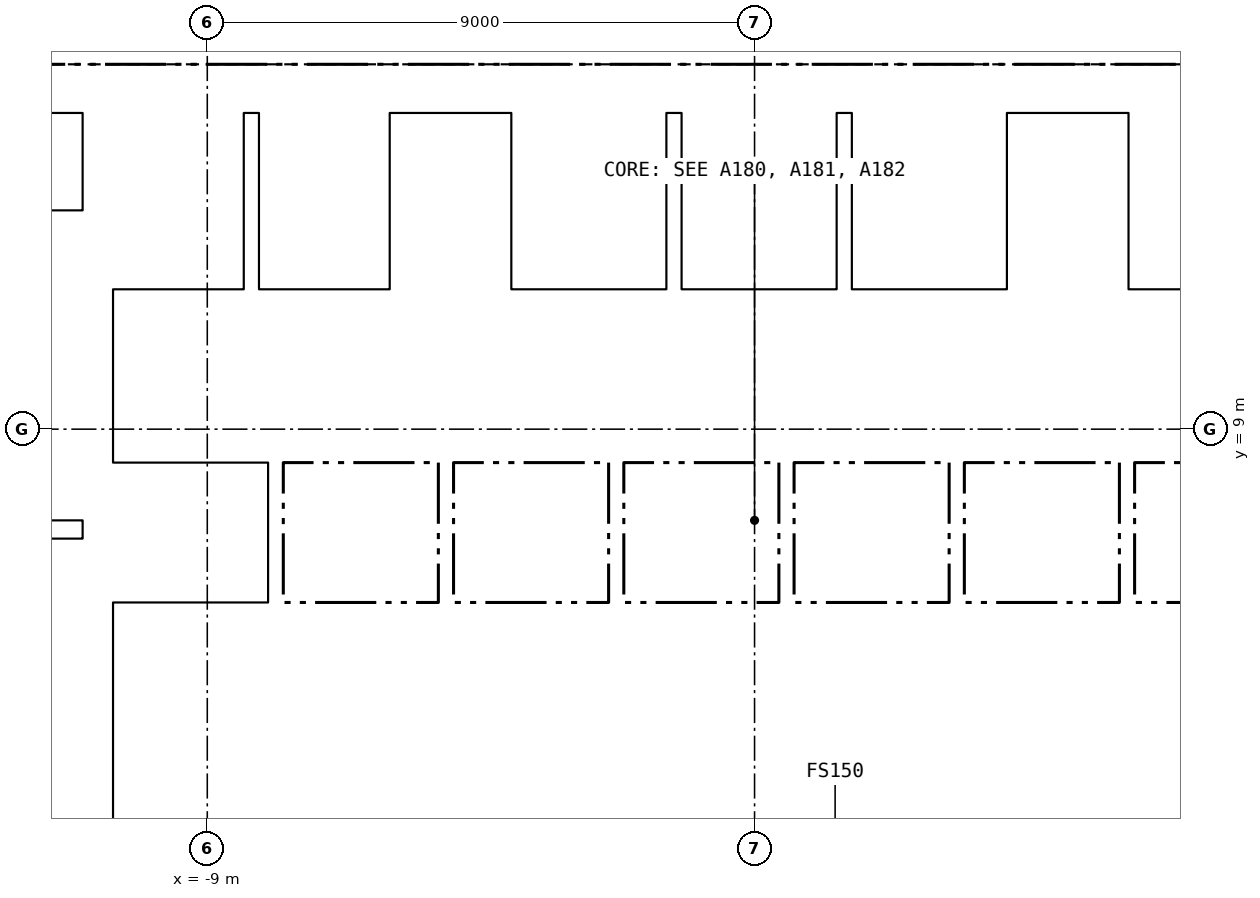
"""IFC4 building model, lengths in metres.
Left out: names, types, materials, properties, quantities, classifications, styles, units other than length and angle.
Written with IfcOpenShell. Run it as: python <this file> out.ifc"""

import sys

from ifc_helpers import new_model, si_unit, direction, frame, frame_2d, origin, place, context, subcontext, project, spatial, rectangle, extrude, element, fill, save


model = new_model("IFC4")
c1 = context("Model", 3, precision=1e-05, world=origin(), true_north=direction((0.0, 1.0)))
c2 = subcontext(c1, "Body", "Model", "MODEL_VIEW")
j1 = project(units=[si_unit("LENGTHUNIT", "METRE"), si_unit("PLANEANGLEUNIT", "RADIAN")], contexts=[c1])
p1 = place(None, origin())
s1 = spatial("IfcSite", under=j1, at=p1, CompositionType="ELEMENT")
p2 = place(p1, origin())
s2 = spatial("IfcBuilding", under=s1, at=p2, CompositionType="ELEMENT")
p3 = place(p2, frame((0.0, 0.0, 148.05)))
s3 = spatial("IfcBuildingStorey", under=s2, at=p3, CompositionType="ELEMENT", Elevation=148.05)
p4 = place(p3, frame((-15.0, 14.6, -0.15), z_axis=(0.0, 0.0, 1.0), x_axis=(1.0, 0.0, 0.0)))
e1 = element("IfcWall", 1, at=p4, inside=s3, PredefinedType="SOLIDWALL", context=c2, shape_type="SweptSolid", body=[
    extrude(rectangle(XDim=30.0, YDim=0.8, at=frame_2d((15.0, 0.0))), origin(), (0.0, 0.0, 1.0), 3.65),
])
p5 = place(p4, frame((9.25, 0.0, 0.15)))
e2 = element("IfcOpeningElement", 2, at=p5, cuts=e1, PredefinedType="OPENING", context=c2, shape_type="SweptSolid", body=[
    extrude(rectangle(XDim=1.5, YDim=2.1, at=frame_2d((0.75, 1.05))), frame((0.0, 0.41, 0.0), z_axis=(0.0, -1.0, 0.0), x_axis=(1.0, 0.0, 0.0)), (0.0, 0.0, 1.0), 0.82),
])
p6 = place(p4, frame((19.4, 0.0, 0.15)))
e3 = element("IfcOpeningElement", 3, at=p6, cuts=e1, PredefinedType="OPENING", context=c2, shape_type="SweptSolid", body=[
    extrude(rectangle(XDim=1.5, YDim=2.1, at=frame_2d((0.75, 1.05))), frame((0.0, 0.41, 0.0), z_axis=(0.0, -1.0, 0.0), x_axis=(1.0, 0.0, 0.0)), (0.0, 0.0, 1.0), 0.82),
])
p7 = place(p4, frame((1.5, 0.0, 0.15)))
e4 = element("IfcOpeningElement", 4, at=p7, cuts=e1, PredefinedType="OPENING", context=c2, shape_type="SweptSolid", body=[
    extrude(rectangle(XDim=1.2, YDim=2.1, at=frame_2d((0.6, 1.05))), frame((0.0, 0.41, 0.0), z_axis=(0.0, -1.0, 0.0), x_axis=(1.0, 0.0, 0.0)), (0.0, 0.0, 1.0), 0.82),
])
p8 = place(p4, frame((27.3, 0.0, 0.15)))
e5 = element("IfcOpeningElement", 5, at=p8, cuts=e1, PredefinedType="OPENING", context=c2, shape_type="SweptSolid", body=[
    extrude(rectangle(XDim=1.2, YDim=2.1, at=frame_2d((0.6, 1.05))), frame((0.0, 0.41, 0.0), z_axis=(0.0, -1.0, 0.0), x_axis=(1.0, 0.0, 0.0)), (0.0, 0.0, 1.0), 0.82),
])
p9 = place(p3, frame((-10.8, 0.8, -0.15), z_axis=(0.0, 0.0, 1.0), x_axis=(0.0, 1.0, 0.0)))
e6 = element("IfcWall", 6, at=p9, inside=s3, PredefinedType="SOLIDWALL", context=c2, shape_type="SweptSolid", body=[
    extrude(rectangle(XDim=13.4, YDim=0.5, at=frame_2d((6.7, 0.0))), origin(), (0.0, 0.0, 1.0), 3.65),
])
p10 = place(p3, frame((-10.55, 3.5, 0.0), z_axis=(0.0, 0.0, 1.0), x_axis=(1.0, 0.0, 0.0)))
e7 = element("IfcWall", 7, at=p10, inside=s3, PredefinedType="PARTITIONING", context=c2, shape_type="SweptSolid", body=[
    extrude(rectangle(XDim=21.1, YDim=0.2, at=frame_2d((10.55, 0.0))), origin(), (0.0, 0.0, 1.0), 3.5),
])
p11 = place(p10, frame((2.312, 0.0, 0.0)))
e8 = element("IfcOpeningElement", 8, at=p11, cuts=e7, PredefinedType="OPENING", context=c2, shape_type="SweptSolid", body=[
    extrude(rectangle(XDim=1.0, YDim=2.1, at=frame_2d((0.5, 1.05))), frame((0.0, 0.11, 0.0), z_axis=(0.0, -1.0, 0.0), x_axis=(1.0, 0.0, 0.0)), (0.0, 0.0, 1.0), 0.22),
])
p12 = place(p10, frame((7.05, 0.0, 0.0)))
e9 = element("IfcOpeningElement", 9, at=p12, cuts=e7, PredefinedType="OPENING", context=c2, shape_type="SweptSolid", body=[
    extrude(rectangle(XDim=1.0, YDim=2.1, at=frame_2d((0.5, 1.05))), frame((0.0, 0.11, 0.0), z_axis=(0.0, -1.0, 0.0), x_axis=(1.0, 0.0, 0.0)), (0.0, 0.0, 1.0), 0.22),
])
p13 = place(p10, frame((10.175, 0.0, 0.0)))
e10 = element("IfcOpeningElement", 10, at=p13, cuts=e7, PredefinedType="OPENING", context=c2, shape_type="SweptSolid", body=[
    extrude(rectangle(XDim=1.0, YDim=2.1, at=frame_2d((0.5, 1.05))), frame((0.0, 0.11, 0.0), z_axis=(0.0, -1.0, 0.0), x_axis=(1.0, 0.0, 0.0)), (0.0, 0.0, 1.0), 0.22),
])
p14 = place(p10, frame((14.05, 0.0, 0.0)))
e11 = element("IfcOpeningElement", 11, at=p14, cuts=e7, PredefinedType="OPENING", context=c2, shape_type="SweptSolid", body=[
    extrude(rectangle(XDim=1.0, YDim=2.1, at=frame_2d((0.5, 1.05))), frame((0.0, 0.11, 0.0), z_axis=(0.0, -1.0, 0.0), x_axis=(1.0, 0.0, 0.0)), (0.0, 0.0, 1.0), 0.22),
])
p15 = place(p10, frame((17.837, 0.0, 0.0)))
e12 = element("IfcOpeningElement", 12, at=p15, cuts=e7, PredefinedType="OPENING", context=c2, shape_type="SweptSolid", body=[
    extrude(rectangle(XDim=0.9, YDim=2.1, at=frame_2d((0.45, 1.05))), frame((0.0, 0.11, 0.0), z_axis=(0.0, -1.0, 0.0), x_axis=(1.0, 0.0, 0.0)), (0.0, 0.0, 1.0), 0.22),
])
p16 = place(p10, frame((19.9, 0.0, 0.0)))
e13 = element("IfcOpeningElement", 13, at=p16, cuts=e7, PredefinedType="OPENING", context=c2, shape_type="SweptSolid", body=[
    extrude(rectangle(XDim=0.9, YDim=2.1, at=frame_2d((0.45, 1.05))), frame((0.0, 0.11, 0.0), z_axis=(0.0, -1.0, 0.0), x_axis=(1.0, 0.0, 0.0)), (0.0, 0.0, 1.0), 0.22),
])
p17 = place(p3, frame((-10.55, 6.025, 0.0), z_axis=(0.0, 0.0, 1.0), x_axis=(1.0, 0.0, 0.0)))
e14 = element("IfcWall", 14, at=p17, inside=s3, PredefinedType="PARTITIONING", context=c2, shape_type="SweptSolid", body=[
    extrude(rectangle(XDim=21.1, YDim=0.25, at=frame_2d((10.55, 0.0))), origin(), (0.0, 0.0, 1.0), 3.5),
])
p18 = place(p3, frame((-10.55, 8.55, 0.0), z_axis=(0.0, 0.0, 1.0), x_axis=(1.0, 0.0, 0.0)))
e15 = element("IfcWall", 15, at=p18, inside=s3, PredefinedType="PARTITIONING", context=c2, shape_type="SweptSolid", body=[
    extrude(rectangle(XDim=21.1, YDim=0.2, at=frame_2d((10.55, 0.0))), origin(), (0.0, 0.0, 1.0), 3.5),
])
p19 = place(p18, frame((0.675, 0.0, 0.0)))
e16 = element("IfcOpeningElement", 16, at=p19, cuts=e15, PredefinedType="OPENING", context=c2, shape_type="SweptSolid", body=[
    extrude(rectangle(XDim=1.2, YDim=2.1, at=frame_2d((0.6, 1.05))), frame((0.0, 0.11, 0.0), z_axis=(0.0, -1.0, 0.0), x_axis=(1.0, 0.0, 0.0)), (0.0, 0.0, 1.0), 0.22),
])
p20 = place(p18, frame((3.475, 0.0, 0.0)))
e17 = element("IfcOpeningElement", 17, at=p20, cuts=e15, PredefinedType="OPENING", context=c2, shape_type="SweptSolid", body=[
    extrude(rectangle(XDim=1.2, YDim=2.1, at=frame_2d((0.6, 1.05))), frame((0.0, 0.11, 0.0), z_axis=(0.0, -1.0, 0.0), x_axis=(1.0, 0.0, 0.0)), (0.0, 0.0, 1.0), 0.22),
])
p21 = place(p18, frame((6.275, 0.0, 0.0)))
e18 = element("IfcOpeningElement", 18, at=p21, cuts=e15, PredefinedType="OPENING", context=c2, shape_type="SweptSolid", body=[
    extrude(rectangle(XDim=1.2, YDim=2.1, at=frame_2d((0.6, 1.05))), frame((0.0, 0.11, 0.0), z_axis=(0.0, -1.0, 0.0), x_axis=(1.0, 0.0, 0.0)), (0.0, 0.0, 1.0), 0.22),
])
p22 = place(p18, frame((9.075, 0.0, 0.0)))
e19 = element("IfcOpeningElement", 19, at=p22, cuts=e15, PredefinedType="OPENING", context=c2, shape_type="SweptSolid", body=[
    extrude(rectangle(XDim=1.2, YDim=2.1, at=frame_2d((0.6, 1.05))), frame((0.0, 0.11, 0.0), z_axis=(0.0, -1.0, 0.0), x_axis=(1.0, 0.0, 0.0)), (0.0, 0.0, 1.0), 0.22),
])
p23 = place(p18, frame((11.875, 0.0, 0.0)))
e20 = element("IfcOpeningElement", 20, at=p23, cuts=e15, PredefinedType="OPENING", context=c2, shape_type="SweptSolid", body=[
    extrude(rectangle(XDim=1.2, YDim=2.1, at=frame_2d((0.6, 1.05))), frame((0.0, 0.11, 0.0), z_axis=(0.0, -1.0, 0.0), x_axis=(1.0, 0.0, 0.0)), (0.0, 0.0, 1.0), 0.22),
])
p24 = place(p18, frame((14.675, 0.0, 0.0)))
e21 = element("IfcOpeningElement", 21, at=p24, cuts=e15, PredefinedType="OPENING", context=c2, shape_type="SweptSolid", body=[
    extrude(rectangle(XDim=1.2, YDim=2.1, at=frame_2d((0.6, 1.05))), frame((0.0, 0.11, 0.0), z_axis=(0.0, -1.0, 0.0), x_axis=(1.0, 0.0, 0.0)), (0.0, 0.0, 1.0), 0.22),
])
p25 = place(p18, frame((17.475, 0.0, 0.0)))
e22 = element("IfcOpeningElement", 22, at=p25, cuts=e15, PredefinedType="OPENING", context=c2, shape_type="SweptSolid", body=[
    extrude(rectangle(XDim=1.2, YDim=2.1, at=frame_2d((0.6, 1.05))), frame((0.0, 0.11, 0.0), z_axis=(0.0, -1.0, 0.0), x_axis=(1.0, 0.0, 0.0)), (0.0, 0.0, 1.0), 0.22),
])
p26 = place(p18, frame((19.9, 0.0, 0.0)))
e23 = element("IfcOpeningElement", 23, at=p26, cuts=e15, PredefinedType="OPENING", context=c2, shape_type="SweptSolid", body=[
    extrude(rectangle(XDim=0.9, YDim=2.1, at=frame_2d((0.45, 1.05))), frame((0.0, 0.11, 0.0), z_axis=(0.0, -1.0, 0.0), x_axis=(1.0, 0.0, 0.0)), (0.0, 0.0, 1.0), 0.22),
])
p27 = place(p3, frame((-10.55, 11.2, 0.0), z_axis=(0.0, 0.0, 1.0), x_axis=(1.0, 0.0, 0.0)))
e24 = element("IfcWall", 24, at=p27, inside=s3, PredefinedType="PARTITIONING", context=c2, shape_type="SweptSolid", body=[
    extrude(rectangle(XDim=4.8, YDim=0.2, at=frame_2d((2.4, 0.0))), origin(), (0.0, 0.0, 1.0), 3.5),
])
p28 = place(p27, frame((0.525, 0.0, 0.0)))
e25 = element("IfcOpeningElement", 25, at=p28, cuts=e24, PredefinedType="OPENING", context=c2, shape_type="SweptSolid", body=[
    extrude(rectangle(XDim=1.1, YDim=2.1, at=frame_2d((0.55, 1.05))), frame((0.0, 0.11, 0.0), z_axis=(0.0, -1.0, 0.0), x_axis=(1.0, 0.0, 0.0)), (0.0, 0.0, 1.0), 0.22),
])
p29 = place(p27, frame((2.925, 0.0, 0.0)))
e26 = element("IfcOpeningElement", 26, at=p29, cuts=e24, PredefinedType="OPENING", context=c2, shape_type="SweptSolid", body=[
    extrude(rectangle(XDim=1.1, YDim=2.1, at=frame_2d((0.55, 1.05))), frame((0.0, 0.11, 0.0), z_axis=(0.0, -1.0, 0.0), x_axis=(1.0, 0.0, 0.0)), (0.0, 0.0, 1.0), 0.22),
])
p30 = place(p3, frame((-4.25, 11.2, 0.0), z_axis=(0.0, 0.0, 1.0), x_axis=(1.0, 0.0, 0.0)))
e27 = element("IfcWall", 27, at=p30, inside=s3, PredefinedType="PARTITIONING", context=c2, shape_type="SweptSolid", body=[
    extrude(rectangle(XDim=8.65, YDim=0.2, at=frame_2d((4.325, 0.0))), origin(), (0.0, 0.0, 1.0), 3.5),
])
p31 = place(p30, frame((0.825, 0.0, 0.0)))
e28 = element("IfcOpeningElement", 28, at=p31, cuts=e27, PredefinedType="OPENING", context=c2, shape_type="SweptSolid", body=[
    extrude(rectangle(XDim=1.4, YDim=2.1, at=frame_2d((0.7, 1.05))), frame((0.0, 0.11, 0.0), z_axis=(0.0, -1.0, 0.0), x_axis=(1.0, 0.0, 0.0)), (0.0, 0.0, 1.0), 0.22),
])
p32 = place(p30, frame((3.625, 0.0, 0.0)))
e29 = element("IfcOpeningElement", 29, at=p32, cuts=e27, PredefinedType="OPENING", context=c2, shape_type="SweptSolid", body=[
    extrude(rectangle(XDim=1.4, YDim=2.1, at=frame_2d((0.7, 1.05))), frame((0.0, 0.11, 0.0), z_axis=(0.0, -1.0, 0.0), x_axis=(1.0, 0.0, 0.0)), (0.0, 0.0, 1.0), 0.22),
])
p33 = place(p3, frame((5.9, 11.2, 0.0), z_axis=(0.0, 0.0, 1.0), x_axis=(1.0, 0.0, 0.0)))
e30 = element("IfcWall", 30, at=p33, inside=s3, PredefinedType="PARTITIONING", context=c2, shape_type="SweptSolid", body=[
    extrude(rectangle(XDim=4.65, YDim=0.2, at=frame_2d((2.325, 0.0))), origin(), (0.0, 0.0, 1.0), 3.5),
])
p34 = place(p33, frame((3.4, 0.0, 0.0)))
e31 = element("IfcOpeningElement", 31, at=p34, cuts=e30, PredefinedType="OPENING", context=c2, shape_type="SweptSolid", body=[
    extrude(rectangle(XDim=0.9, YDim=2.1, at=frame_2d((0.45, 1.05))), frame((0.0, 0.11, 0.0), z_axis=(0.0, -1.0, 0.0), x_axis=(1.0, 0.0, 0.0)), (0.0, 0.0, 1.0), 0.22),
])
p35 = place(p3, frame((-4.125, 8.65, 0.0), z_axis=(0.0, 0.0, 1.0), x_axis=(0.0, 1.0, 0.0)))
e32 = element("IfcWall", 32, at=p35, inside=s3, PredefinedType="PARTITIONING", context=c2, shape_type="SweptSolid", body=[
    extrude(rectangle(XDim=2.45, YDim=0.25, at=frame_2d((1.225, 0.0))), origin(), (0.0, 0.0, 1.0), 3.5),
])
p36 = place(p35, frame((0.625, 0.0, 0.0)))
e33 = element("IfcOpeningElement", 33, at=p36, cuts=e32, PredefinedType="OPENING", context=c2, shape_type="SweptSolid", body=[
    extrude(rectangle(XDim=1.2, YDim=2.1, at=frame_2d((0.6, 1.05))), frame((0.0, 0.135, 0.0), z_axis=(0.0, -1.0, 0.0), x_axis=(1.0, 0.0, 0.0)), (0.0, 0.0, 1.0), 0.27),
])
for number, where, z_axis, x_axis in (
    (34, (-4.85, 3.6, 0.0), (0.0, 0.0, 1.0), (0.0, 1.0, 0.0)),
    (35, (-1.15, 3.6, 0.0), (0.0, 0.0, 1.0), (0.0, 1.0, 0.0)),
    (36, (1.4, 3.6, 0.0), (0.0, 0.0, 1.0), (0.0, 1.0, 0.0)),
    (37, (6.6, 3.6, 0.0), (0.0, 0.0, 1.0), (0.0, 1.0, 0.0)),
):
    element("IfcWall", number, at=place(p3, frame(where, z_axis=z_axis, x_axis=x_axis)), inside=s3, PredefinedType="PARTITIONING", context=c2, shape_type="SweptSolid", body=[
        extrude(rectangle(XDim=2.3, YDim=0.15, at=frame_2d((1.15, 0.0))), origin(), (0.0, 0.0, 1.0), 3.5),
    ])
for number, where, z_axis, x_axis in (
    (38, (-7.875, 6.15, 0.0), (0.0, 0.0, 1.0), (0.0, 1.0, 0.0)),
    (39, (-5.075, 6.15, 0.0), (0.0, 0.0, 1.0), (0.0, 1.0, 0.0)),
    (40, (-2.275, 6.15, 0.0), (0.0, 0.0, 1.0), (0.0, 1.0, 0.0)),
    (41, (0.525, 6.15, 0.0), (0.0, 0.0, 1.0), (0.0, 1.0, 0.0)),
    (42, (3.325, 6.15, 0.0), (0.0, 0.0, 1.0), (0.0, 1.0, 0.0)),
    (43, (6.125, 6.15, 0.0), (0.0, 0.0, 1.0), (0.0, 1.0, 0.0)),
):
    element("IfcWall", number, at=place(p3, frame(where, z_axis=z_axis, x_axis=x_axis)), inside=s3, PredefinedType="PARTITIONING", context=c2, shape_type="SweptSolid", body=[
        extrude(rectangle(XDim=2.3, YDim=0.25, at=frame_2d((1.15, 0.0))), origin(), (0.0, 0.0, 1.0), 3.5),
    ])
for number, where, z_axis, x_axis in (
    (44, (-8.275, 11.3, 0.0), (0.0, 0.0, 1.0), (0.0, 1.0, 0.0)),
    (45, (-5.875, 11.3, 0.0), (0.0, 0.0, 1.0), (0.0, 1.0, 0.0)),
    (46, (-4.125, 11.3, 0.0), (0.0, 0.0, 1.0), (0.0, 1.0, 0.0)),
    (47, (-1.325, 11.3, 0.0), (0.0, 0.0, 1.0), (0.0, 1.0, 0.0)),
    (48, (1.475, 11.3, 0.0), (0.0, 0.0, 1.0), (0.0, 1.0, 0.0)),
    (49, (4.275, 11.3, 0.0), (0.0, 0.0, 1.0), (0.0, 1.0, 0.0)),
    (50, (6.025, 11.3, 0.0), (0.0, 0.0, 1.0), (0.0, 1.0, 0.0)),
):
    element("IfcWall", number, at=place(p3, frame(where, z_axis=z_axis, x_axis=x_axis)), inside=s3, PredefinedType="PARTITIONING", context=c2, shape_type="SweptSolid", body=[
        extrude(rectangle(XDim=2.9, YDim=0.25, at=frame_2d((1.45, 0.0))), origin(), (0.0, 0.0, 1.0), 3.5),
    ])
p37 = place(p3, frame((-14.0, 7.35, 0.0), z_axis=(0.0, 0.0, 1.0), x_axis=(1.0, 0.0, 0.0)))
e51 = element("IfcWall", 51, at=p37, inside=s3, PredefinedType="SOLIDWALL", context=c2, shape_type="SweptSolid", body=[
    extrude(rectangle(XDim=2.95, YDim=0.3, at=frame_2d((1.475, 0.0))), origin(), (0.0, 0.0, 1.0), 3.5),
])
p38 = place(p36, origin())
e52 = element("IfcDoor", 52, at=p38, inside=s3, OperationType="SINGLE_SWING_LEFT", PredefinedType="DOOR", context=c2, shape_type="SweptSolid", body=[
    extrude(rectangle(XDim=1.2, YDim=2.1, at=frame_2d((0.6, 1.05))), frame((0.0, 0.025, 0.0), z_axis=(0.0, -1.0, 0.0), x_axis=(1.0, 0.0, 0.0)), (0.0, 0.0, 1.0), 0.05),
])
fill(e33, e52)
p39 = place(p11, origin())
e53 = element("IfcDoor", 53, at=p39, inside=s3, OperationType="SINGLE_SWING_LEFT", PredefinedType="DOOR", context=c2, shape_type="SweptSolid", body=[
    extrude(rectangle(XDim=1.0, YDim=2.1, at=frame_2d((0.5, 1.05))), frame((0.0, 0.025, 0.0), z_axis=(0.0, -1.0, 0.0), x_axis=(1.0, 0.0, 0.0)), (0.0, 0.0, 1.0), 0.05),
])
fill(e8, e53)
p40 = place(p12, origin())
e54 = element("IfcDoor", 54, at=p40, inside=s3, OperationType="SINGLE_SWING_RIGHT", PredefinedType="DOOR", context=c2, shape_type="SweptSolid", body=[
    extrude(rectangle(XDim=1.0, YDim=2.1, at=frame_2d((0.5, 1.05))), frame((0.0, 0.025, 0.0), z_axis=(0.0, -1.0, 0.0), x_axis=(1.0, 0.0, 0.0)), (0.0, 0.0, 1.0), 0.05),
])
fill(e9, e54)
p41 = place(p13, origin())
e55 = element("IfcDoor", 55, at=p41, inside=s3, OperationType="SINGLE_SWING_LEFT", PredefinedType="DOOR", context=c2, shape_type="SweptSolid", body=[
    extrude(rectangle(XDim=1.0, YDim=2.1, at=frame_2d((0.5, 1.05))), frame((0.0, 0.025, 0.0), z_axis=(0.0, -1.0, 0.0), x_axis=(1.0, 0.0, 0.0)), (0.0, 0.0, 1.0), 0.05),
])
fill(e10, e55)
p42 = place(p14, origin())
e56 = element("IfcDoor", 56, at=p42, inside=s3, OperationType="SINGLE_SWING_RIGHT", PredefinedType="DOOR", context=c2, shape_type="SweptSolid", body=[
    extrude(rectangle(XDim=1.0, YDim=2.1, at=frame_2d((0.5, 1.05))), frame((0.0, 0.025, 0.0), z_axis=(0.0, -1.0, 0.0), x_axis=(1.0, 0.0, 0.0)), (0.0, 0.0, 1.0), 0.05),
])
fill(e11, e56)
p43 = place(p19, origin())
e57 = element("IfcDoor", 57, at=p43, inside=s3, OperationType="DOUBLE_DOOR_SLIDING", PredefinedType="DOOR", context=c2, shape_type="SweptSolid", body=[
    extrude(rectangle(XDim=1.2, YDim=2.1, at=frame_2d((0.6, 1.05))), frame((0.0, 0.025, 0.0), z_axis=(0.0, -1.0, 0.0), x_axis=(1.0, 0.0, 0.0)), (0.0, 0.0, 1.0), 0.05),
])
fill(e16, e57)
p44 = place(p20, origin())
e58 = element("IfcDoor", 58, at=p44, inside=s3, OperationType="DOUBLE_DOOR_SLIDING", PredefinedType="DOOR", context=c2, shape_type="SweptSolid", body=[
    extrude(rectangle(XDim=1.2, YDim=2.1, at=frame_2d((0.6, 1.05))), frame((0.0, 0.025, 0.0), z_axis=(0.0, -1.0, 0.0), x_axis=(1.0, 0.0, 0.0)), (0.0, 0.0, 1.0), 0.05),
])
fill(e17, e58)
p45 = place(p21, origin())
e59 = element("IfcDoor", 59, at=p45, inside=s3, OperationType="DOUBLE_DOOR_SLIDING", PredefinedType="DOOR", context=c2, shape_type="SweptSolid", body=[
    extrude(rectangle(XDim=1.2, YDim=2.1, at=frame_2d((0.6, 1.05))), frame((0.0, 0.025, 0.0), z_axis=(0.0, -1.0, 0.0), x_axis=(1.0, 0.0, 0.0)), (0.0, 0.0, 1.0), 0.05),
])
fill(e18, e59)
p46 = place(p22, origin())
e60 = element("IfcDoor", 60, at=p46, inside=s3, OperationType="DOUBLE_DOOR_SLIDING", PredefinedType="DOOR", context=c2, shape_type="SweptSolid", body=[
    extrude(rectangle(XDim=1.2, YDim=2.1, at=frame_2d((0.6, 1.05))), frame((0.0, 0.025, 0.0), z_axis=(0.0, -1.0, 0.0), x_axis=(1.0, 0.0, 0.0)), (0.0, 0.0, 1.0), 0.05),
])
fill(e19, e60)
p47 = place(p23, origin())
e61 = element("IfcDoor", 61, at=p47, inside=s3, OperationType="DOUBLE_DOOR_SLIDING", PredefinedType="DOOR", context=c2, shape_type="SweptSolid", body=[
    extrude(rectangle(XDim=1.2, YDim=2.1, at=frame_2d((0.6, 1.05))), frame((0.0, 0.025, 0.0), z_axis=(0.0, -1.0, 0.0), x_axis=(1.0, 0.0, 0.0)), (0.0, 0.0, 1.0), 0.05),
])
fill(e20, e61)
p48 = place(p24, origin())
e62 = element("IfcDoor", 62, at=p48, inside=s3, OperationType="DOUBLE_DOOR_SLIDING", PredefinedType="DOOR", context=c2, shape_type="SweptSolid", body=[
    extrude(rectangle(XDim=1.2, YDim=2.1, at=frame_2d((0.6, 1.05))), frame((0.0, 0.025, 0.0), z_axis=(0.0, -1.0, 0.0), x_axis=(1.0, 0.0, 0.0)), (0.0, 0.0, 1.0), 0.05),
])
fill(e21, e62)
p49 = place(p25, origin())
e63 = element("IfcDoor", 63, at=p49, inside=s3, OperationType="DOUBLE_DOOR_SLIDING", PredefinedType="DOOR", context=c2, shape_type="SweptSolid", body=[
    extrude(rectangle(XDim=1.2, YDim=2.1, at=frame_2d((0.6, 1.05))), frame((0.0, 0.025, 0.0), z_axis=(0.0, -1.0, 0.0), x_axis=(1.0, 0.0, 0.0)), (0.0, 0.0, 1.0), 0.05),
])
fill(e22, e63)
p50 = place(p28, origin())
e64 = element("IfcDoor", 64, at=p50, inside=s3, OperationType="DOUBLE_DOOR_SLIDING", PredefinedType="DOOR", context=c2, shape_type="SweptSolid", body=[
    extrude(rectangle(XDim=1.1, YDim=2.1, at=frame_2d((0.55, 1.05))), frame((0.0, 0.025, 0.0), z_axis=(0.0, -1.0, 0.0), x_axis=(1.0, 0.0, 0.0)), (0.0, 0.0, 1.0), 0.05),
])
fill(e25, e64)
p51 = place(p29, origin())
e65 = element("IfcDoor", 65, at=p51, inside=s3, OperationType="DOUBLE_DOOR_SLIDING", PredefinedType="DOOR", context=c2, shape_type="SweptSolid", body=[
    extrude(rectangle(XDim=1.1, YDim=2.1, at=frame_2d((0.55, 1.05))), frame((0.0, 0.025, 0.0), z_axis=(0.0, -1.0, 0.0), x_axis=(1.0, 0.0, 0.0)), (0.0, 0.0, 1.0), 0.05),
])
fill(e26, e65)
p52 = place(p31, origin())
e66 = element("IfcDoor", 66, at=p52, inside=s3, OperationType="DOUBLE_DOOR_SLIDING", PredefinedType="DOOR", context=c2, shape_type="SweptSolid", body=[
    extrude(rectangle(XDim=1.4, YDim=2.1, at=frame_2d((0.7, 1.05))), frame((0.0, 0.025, 0.0), z_axis=(0.0, -1.0, 0.0), x_axis=(1.0, 0.0, 0.0)), (0.0, 0.0, 1.0), 0.05),
])
fill(e28, e66)
p53 = place(p32, origin())
e67 = element("IfcDoor", 67, at=p53, inside=s3, OperationType="DOUBLE_DOOR_SLIDING", PredefinedType="DOOR", context=c2, shape_type="SweptSolid", body=[
    extrude(rectangle(XDim=1.4, YDim=2.1, at=frame_2d((0.7, 1.05))), frame((0.0, 0.025, 0.0), z_axis=(0.0, -1.0, 0.0), x_axis=(1.0, 0.0, 0.0)), (0.0, 0.0, 1.0), 0.05),
])
fill(e29, e67)
p54 = place(p5, origin())
e68 = element("IfcDoor", 68, at=p54, inside=s3, OperationType="DOUBLE_DOOR_SINGLE_SWING", PredefinedType="DOOR", context=c2, shape_type="SweptSolid", body=[
    extrude(rectangle(XDim=1.5, YDim=2.1, at=frame_2d((0.75, 1.05))), frame((0.0, 0.025, 0.0), z_axis=(0.0, -1.0, 0.0), x_axis=(1.0, 0.0, 0.0)), (0.0, 0.0, 1.0), 0.05),
])
fill(e2, e68)
p55 = place(p6, origin())
e69 = element("IfcDoor", 69, at=p55, inside=s3, OperationType="DOUBLE_DOOR_SINGLE_SWING", PredefinedType="DOOR", context=c2, shape_type="SweptSolid", body=[
    extrude(rectangle(XDim=1.5, YDim=2.1, at=frame_2d((0.75, 1.05))), frame((0.0, 0.025, 0.0), z_axis=(0.0, -1.0, 0.0), x_axis=(1.0, 0.0, 0.0)), (0.0, 0.0, 1.0), 0.05),
])
fill(e3, e69)
save(model, sys.argv[1])
